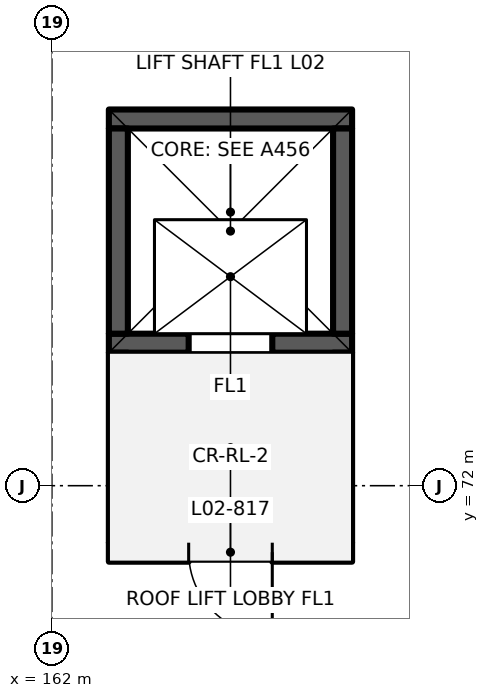
"""IFC4 building model, lengths in metres.
Left out: names, types, materials, properties, quantities, classifications, styles, units other than length and angle.
Written with IfcOpenShell. Run it as: python <this file> out.ifc"""

import sys

from ifc_helpers import new_model, si_unit, direction, frame, frame_2d, origin, place, context, subcontext, project, spatial, rectangle, extrude, element, fill, save


model = new_model("IFC4")
c1 = context("Model", 3, precision=1e-05, world=origin(), true_north=direction((0.0, 1.0)))
c2 = subcontext(c1, "Body", "Model", "MODEL_VIEW")
j1 = project(units=[si_unit("LENGTHUNIT", "METRE"), si_unit("PLANEANGLEUNIT", "RADIAN")], contexts=[c1])
p1 = place(None, origin())
s1 = spatial("IfcSite", under=j1, at=p1, CompositionType="ELEMENT")
p2 = place(p1, origin())
s2 = spatial("IfcBuilding", under=s1, at=p2, CompositionType="ELEMENT")
p3 = place(p2, frame((0.0, 0.0, 10.5)))
s3 = spatial("IfcBuildingStorey", under=s2, at=p3, CompositionType="ELEMENT", Elevation=10.5)
p4 = place(p3, frame((162.75, 73.875, 0.0), z_axis=(0.0, 0.0, 1.0), x_axis=(1.0, 0.0, 0.0)))
e1 = element("IfcWall", 1, at=p4, inside=s3, PredefinedType="SHEAR", context=c2, shape_type="SweptSolid", body=[
    extrude(rectangle(XDim=3.2, YDim=0.25, at=frame_2d((1.6, 0.0))), origin(), (0.0, 0.0, 1.0), 4.5),
])
p5 = place(p4, frame((1.05, 0.0, 0.0)))
e2 = element("IfcOpeningElement", 2, at=p5, cuts=e1, PredefinedType="OPENING", context=c2, shape_type="SweptSolid", body=[
    extrude(rectangle(XDim=1.1, YDim=2.1, at=frame_2d((0.55, 1.05))), frame((0.0, 0.135, 0.0), z_axis=(0.0, -1.0, 0.0), x_axis=(1.0, 0.0, 0.0)), (0.0, 0.0, 1.0), 0.27),
])
p6 = place(p3, frame((162.75, 76.825, 0.0), z_axis=(0.0, 0.0, 1.0), x_axis=(1.0, 0.0, 0.0)))
e3 = element("IfcWall", 3, at=p6, inside=s3, PredefinedType="SHEAR", context=c2, shape_type="SweptSolid", body=[
    extrude(rectangle(XDim=3.2, YDim=0.25, at=frame_2d((1.6, 0.0))), origin(), (0.0, 0.0, 1.0), 4.5),
])
for number, where, z_axis, x_axis in (
    (4, (162.875, 74.0, 0.0), (0.0, 0.0, 1.0), (0.0, 1.0, 0.0)),
    (5, (165.825, 74.0, 0.0), (0.0, 0.0, 1.0), (0.0, 1.0, 0.0)),
):
    element("IfcWall", number, at=place(p3, frame(where, z_axis=z_axis, x_axis=x_axis)), inside=s3, PredefinedType="SHEAR", context=c2, shape_type="SweptSolid", body=[
        extrude(rectangle(XDim=2.7, YDim=0.25, at=frame_2d((1.35, 0.0))), origin(), (0.0, 0.0, 1.0), 4.5),
    ])
p7 = place(p3, frame((162.75, 71.125, 0.0), z_axis=(0.0, 0.0, 1.0), x_axis=(1.0, 0.0, 0.0)))
e6 = element("IfcWall", 6, at=p7, inside=s3, PredefinedType="SHEAR", context=c2, shape_type="SweptSolid", body=[
    extrude(rectangle(XDim=3.2, YDim=0.25, at=frame_2d((1.6, 0.0))), origin(), (0.0, 0.0, 1.0), 3.0),
])
p8 = place(p7, frame((2.15, 0.0, 0.0), z_axis=(0.0, 0.0, 1.0), x_axis=(-1.0, 0.0, 0.0)))
e7 = element("IfcOpeningElement", 7, at=p8, cuts=e6, PredefinedType="OPENING", context=c2, shape_type="SweptSolid", body=[
    extrude(rectangle(XDim=1.1, YDim=2.1, at=frame_2d((0.55, 1.05))), frame((0.0, 0.135, 0.0), z_axis=(0.0, -1.0, 0.0), x_axis=(1.0, 0.0, 0.0)), (0.0, 0.0, 1.0), 0.27),
])
for number, where, z_axis, x_axis in (
    (8, (162.875, 71.25, 0.0), (0.0, 0.0, 1.0), (0.0, 1.0, 0.0)),
    (9, (165.825, 71.25, 0.0), (0.0, 0.0, 1.0), (0.0, 1.0, 0.0)),
):
    element("IfcWall", number, at=place(p3, frame(where, z_axis=z_axis, x_axis=x_axis)), inside=s3, PredefinedType="SHEAR", context=c2, shape_type="SweptSolid", body=[
        extrude(rectangle(XDim=2.5, YDim=0.25, at=frame_2d((1.25, 0.0))), origin(), (0.0, 0.0, 1.0), 3.0),
    ])
p9 = place(p5, origin())
e10 = element("IfcDoor", 10, at=p9, inside=s3, OperationType="DOUBLE_DOOR_SLIDING", PredefinedType="DOOR", context=c2, shape_type="SweptSolid", body=[
    extrude(rectangle(XDim=1.1, YDim=2.1, at=frame_2d((0.55, 1.05))), frame((0.0, 0.025, 0.0), z_axis=(0.0, -1.0, 0.0), x_axis=(1.0, 0.0, 0.0)), (0.0, 0.0, 1.0), 0.05),
])
fill(e2, e10)
p10 = place(p8, origin())
e11 = element("IfcDoor", 11, at=p10, inside=s3, OperationType="SINGLE_SWING_LEFT", PredefinedType="DOOR", context=c2, shape_type="SweptSolid", body=[
    extrude(rectangle(XDim=1.1, YDim=2.1, at=frame_2d((0.55, 1.05))), frame((0.0, 0.025, 0.0), z_axis=(0.0, -1.0, 0.0), x_axis=(1.0, 0.0, 0.0)), (0.0, 0.0, 1.0), 0.05),
])
fill(e7, e11)
save(model, sys.argv[1])
